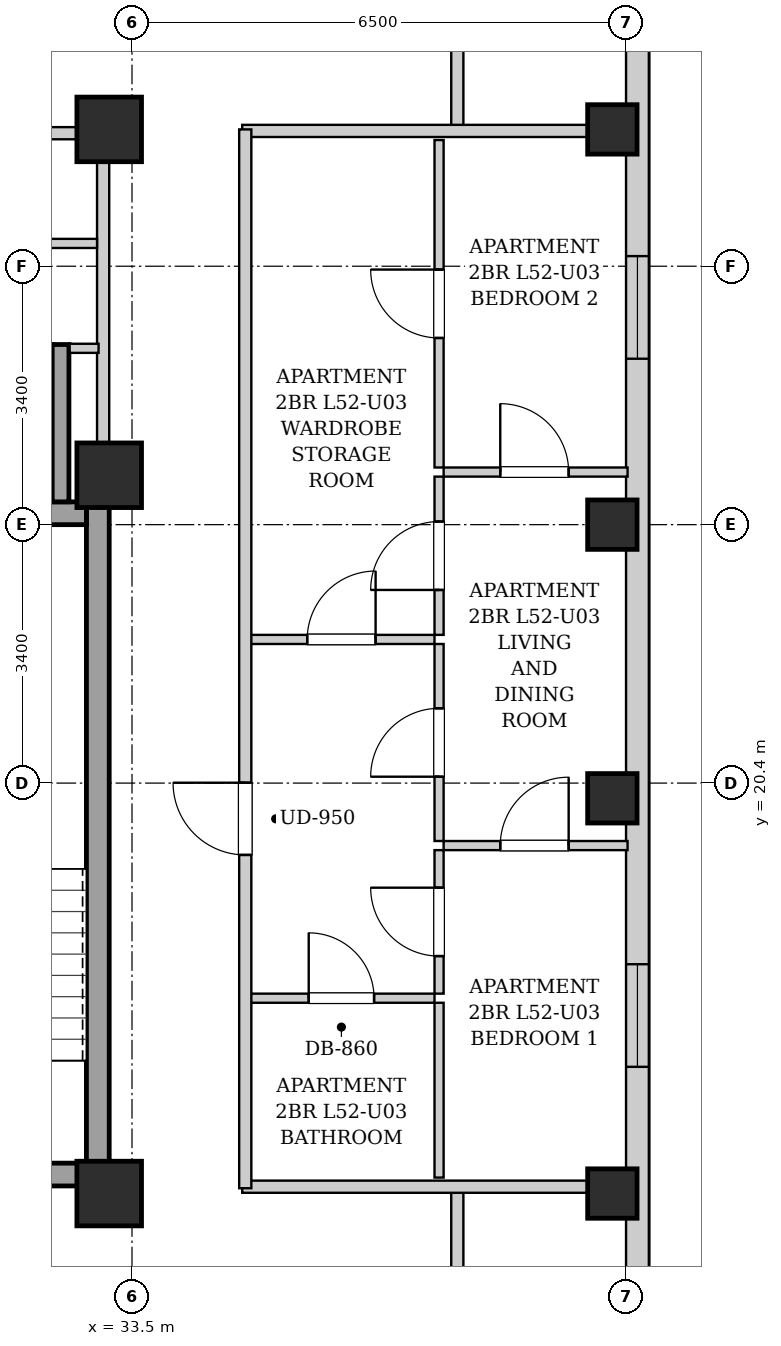
"""IFC4 building model, lengths in metres.
Left out: names, types, materials, properties, quantities, classifications, styles, units other than length and angle.
Written with IfcOpenShell. Run it as: python <this file> out.ifc"""

import sys

from ifc_helpers import new_model, si_unit, direction, frame, frame_2d, origin, origin_2d, place, context, subcontext, project, spatial, rectangle, extrude, element, fill, save


model = new_model("IFC4")
c1 = context("Model", 3, precision=1e-05, world=origin(), true_north=direction((0.0, 1.0)))
c2 = subcontext(c1, "Body", "Model", "MODEL_VIEW")
j1 = project(units=[si_unit("LENGTHUNIT", "METRE"), si_unit("PLANEANGLEUNIT", "RADIAN")], contexts=[c1])
p1 = place(None, origin())
s1 = spatial("IfcSite", under=j1, at=p1, CompositionType="ELEMENT")
p2 = place(p1, origin())
s2 = spatial("IfcBuilding", under=s1, at=p2, CompositionType="ELEMENT")
p3 = place(p2, frame((0.0, 0.0, 181.0)))
s3 = spatial("IfcBuildingStorey", under=s2, at=p3, CompositionType="ELEMENT", Elevation=181.0)
for number, where, z_axis, x_axis in (
    (1, (39.82, 15.0, 0.0), (0.0, 0.0, 1.0), (1.0, 0.0, 0.0)),
    (2, (39.82, 20.2, 0.0), (0.0, 0.0, 1.0), (1.0, 0.0, 0.0)),
    (3, (39.82, 23.8, 0.0), (0.0, 0.0, 1.0), (1.0, 0.0, 0.0)),
    (4, (39.82, 29.0, 0.0), (0.0, 0.0, 1.0), (1.0, 0.0, 0.0)),
):
    element("IfcColumn", number, at=place(p3, frame(where, z_axis=z_axis, x_axis=x_axis)), inside=s3, PredefinedType="COLUMN", context=c2, shape_type="SweptSolid", body=[
        extrude(rectangle(XDim=0.65, YDim=0.65, at=origin_2d()), origin(), (0.0, 0.0, 1.0), 3.3),
    ])
for number, where, z_axis, x_axis in (
    (5, (33.2, 15.0, 0.0), (0.0, 0.0, 1.0), (1.0, 0.0, 0.0)),
    (6, (33.2, 29.0, 0.0), (0.0, 0.0, 1.0), (1.0, 0.0, 0.0)),
    (7, (33.2, 24.45, 0.0), (0.0, 0.0, 1.0), (1.0, 0.0, 0.0)),
):
    element("IfcColumn", number, at=place(p3, frame(where, z_axis=z_axis, x_axis=x_axis)), inside=s3, PredefinedType="COLUMN", context=c2, shape_type="SweptSolid", body=[
        extrude(rectangle(XDim=0.85, YDim=0.85, at=origin_2d()), origin(), (0.0, 0.0, 1.0), 3.3),
    ])
p4 = place(p3, frame((40.15, 37.7, 0.0), z_axis=(0.0, 0.0, 1.0), x_axis=(0.0, -1.0, 0.0)))
e8 = element("IfcWall", 8, at=p4, inside=s3, PredefinedType="SOLIDWALL", context=c2, shape_type="SweptSolid", body=[
    extrude(rectangle(XDim=31.4, YDim=0.3, at=frame_2d((15.7, 0.0))), origin(), (0.0, 0.0, 1.0), 3.04),
])
p5 = place(p4, frame((28.396, 0.0, 0.55)))
e9 = element("IfcOpeningElement", 9, at=p5, cuts=e8, PredefinedType="OPENING", context=c2, shape_type="SweptSolid", body=[
    extrude(rectangle(XDim=1.35, YDim=1.2, at=frame_2d((0.675, 0.6))), frame((0.0, 0.16, 0.0), z_axis=(0.0, -1.0, 0.0), x_axis=(1.0, 0.0, 0.0)), (0.0, 0.0, 1.0), 0.32),
])
p6 = place(p4, frame((1.653, 0.0, 0.55)))
e10 = element("IfcOpeningElement", 10, at=p6, cuts=e8, PredefinedType="OPENING", context=c2, shape_type="SweptSolid", body=[
    extrude(rectangle(XDim=1.35, YDim=1.2, at=frame_2d((0.675, 0.6))), frame((0.0, 0.16, 0.0), z_axis=(0.0, -1.0, 0.0), x_axis=(1.0, 0.0, 0.0)), (0.0, 0.0, 1.0), 0.32),
])
p7 = place(p4, frame((19.683, 0.0, 0.55)))
e11 = element("IfcOpeningElement", 11, at=p7, cuts=e8, PredefinedType="OPENING", context=c2, shape_type="SweptSolid", body=[
    extrude(rectangle(XDim=1.35, YDim=1.2, at=frame_2d((0.675, 0.6))), frame((0.0, 0.16, 0.0), z_axis=(0.0, -1.0, 0.0), x_axis=(1.0, 0.0, 0.0)), (0.0, 0.0, 1.0), 0.32),
])
p8 = place(p4, frame((10.367, 0.0, 0.55)))
e12 = element("IfcOpeningElement", 12, at=p8, cuts=e8, PredefinedType="OPENING", context=c2, shape_type="SweptSolid", body=[
    extrude(rectangle(XDim=1.35, YDim=1.2, at=frame_2d((0.675, 0.6))), frame((0.0, 0.16, 0.0), z_axis=(0.0, -1.0, 0.0), x_axis=(1.0, 0.0, 0.0)), (0.0, 0.0, 1.0), 0.32),
])
p9 = place(p3, frame((33.05, 15.1, 0.0), z_axis=(0.0, 0.0, 1.0), x_axis=(0.0, 1.0, 0.0)))
e13 = element("IfcWall", 13, at=p9, inside=s3, PredefinedType="SHEAR", context=c2, shape_type="SweptSolid", body=[
    extrude(rectangle(XDim=9.0, YDim=0.3, at=frame_2d((4.5, 0.0))), origin(), (0.0, 0.0, 1.0), 3.04),
])
p10 = place(p3, frame((30.05, 23.95, 0.0), z_axis=(0.0, 0.0, 1.0), x_axis=(1.0, 0.0, 0.0)))
e14 = element("IfcWall", 14, at=p10, inside=s3, PredefinedType="SHEAR", context=c2, shape_type="SweptSolid", body=[
    extrude(rectangle(XDim=2.85, YDim=0.3, at=frame_2d((1.425, 0.0))), origin(), (0.0, 0.0, 1.0), 3.04),
])
p11 = place(p3, frame((30.05, 15.25, 0.0), z_axis=(0.0, 0.0, 1.0), x_axis=(1.0, 0.0, 0.0)))
e15 = element("IfcWall", 15, at=p11, inside=s3, PredefinedType="SHEAR", context=c2, shape_type="SweptSolid", body=[
    extrude(rectangle(XDim=2.85, YDim=0.3, at=frame_2d((1.425, 0.0))), origin(), (0.0, 0.0, 1.0), 3.04),
])
p12 = place(p11, frame((0.86, 0.0, 0.0)))
e16 = element("IfcOpeningElement", 16, at=p12, cuts=e15, PredefinedType="OPENING", context=c2, shape_type="SweptSolid", body=[
    extrude(rectangle(XDim=1.1, YDim=2.05, at=frame_2d((0.55, 1.025))), frame((0.0, 0.16, 0.0), z_axis=(0.0, -1.0, 0.0), x_axis=(1.0, 0.0, 0.0)), (0.0, 0.0, 1.0), 0.32),
])
p13 = place(p3, frame((32.56, 24.1, 0.0), z_axis=(0.0, 0.0, 1.0), x_axis=(0.0, 1.0, 0.0)))
e17 = element("IfcWall", 17, at=p13, inside=s3, PredefinedType="SHEAR", context=c2, shape_type="SweptSolid", body=[
    extrude(rectangle(XDim=2.07, YDim=0.22, at=frame_2d((1.035, 0.0))), origin(), (0.0, 0.0, 1.0), 3.04),
])
p14 = place(p3, frame((33.12, 24.12, 0.0), z_axis=(0.0, 0.0, 1.0), x_axis=(0.0, 1.0, 0.0)))
e18 = element("IfcWall", 18, at=p14, inside=s3, PredefinedType="PARTITIONING", context=c2, shape_type="SweptSolid", body=[
    extrude(rectangle(XDim=4.76, YDim=0.16, at=frame_2d((2.38, 0.0))), origin(), (0.0, 0.0, 1.0), 3.04),
])
p15 = place(p3, frame((32.68, 26.12, 0.0), z_axis=(0.0, 0.0, 1.0), x_axis=(1.0, 0.0, 0.0)))
e19 = element("IfcWall", 19, at=p15, inside=s3, PredefinedType="PARTITIONING", context=c2, shape_type="SweptSolid", body=[
    extrude(rectangle(XDim=0.38, YDim=0.12, at=frame_2d((0.19, 0.0))), origin(), (0.0, 0.0, 1.0), 3.04),
])
p16 = place(p3, frame((30.12, 27.5, 0.0), z_axis=(0.0, 0.0, 1.0), x_axis=(1.0, 0.0, 0.0)))
e20 = element("IfcWall", 20, at=p16, inside=s3, PredefinedType="PARTITIONING", context=c2, shape_type="SweptSolid", body=[
    extrude(rectangle(XDim=2.92, YDim=0.12, at=frame_2d((1.46, 0.0))), origin(), (0.0, 0.0, 1.0), 3.04),
])
p17 = place(p16, frame((0.97, 0.0, 0.0)))
e21 = element("IfcOpeningElement", 21, at=p17, cuts=e20, PredefinedType="OPENING", context=c2, shape_type="SweptSolid", body=[
    extrude(rectangle(XDim=0.86, YDim=2.05, at=frame_2d((0.43, 1.025))), frame((0.0, 0.07, 0.0), z_axis=(0.0, -1.0, 0.0), x_axis=(1.0, 0.0, 0.0)), (0.0, 0.0, 1.0), 0.14),
])
p18 = place(p3, frame((25.72, 28.95, 0.0), z_axis=(0.0, 0.0, 1.0), x_axis=(1.0, 0.0, 0.0)))
e22 = element("IfcWall", 22, at=p18, inside=s3, PredefinedType="PARTITIONING", context=c2, shape_type="SweptSolid", body=[
    extrude(rectangle(XDim=7.32, YDim=0.16, at=frame_2d((3.66, 0.0))), origin(), (0.0, 0.0, 1.0), 2.556),
])
p19 = place(p18, frame((1.27, 0.0, 0.0)))
e23 = element("IfcOpeningElement", 23, at=p19, cuts=e22, PredefinedType="OPENING", context=c2, shape_type="SweptSolid", body=[
    extrude(rectangle(XDim=0.86, YDim=2.05, at=frame_2d((0.43, 1.025))), frame((0.0, 0.09, 0.0), z_axis=(0.0, -1.0, 0.0), x_axis=(1.0, 0.0, 0.0)), (0.0, 0.0, 1.0), 0.18),
])
for number, where, z_axis, x_axis in (
    (24, (37.78, 13.51, 0.0), (0.0, 0.0, 1.0), (0.0, 1.0, 0.0)),
    (25, (37.78, 28.98, 0.0), (0.0, 0.0, 1.0), (0.0, 1.0, 0.0)),
):
    element("IfcWall", number, at=place(p3, frame(where, z_axis=z_axis, x_axis=x_axis)), inside=s3, PredefinedType="PARTITIONING", context=c2, shape_type="SweptSolid", body=[
        extrude(rectangle(XDim=1.58, YDim=0.16, at=frame_2d((0.79, 0.0))), origin(), (0.0, 0.0, 1.0), 3.04),
    ])
for number, where, z_axis, x_axis in (
    (26, (34.95, 15.09, 0.0), (0.0, 0.0, 1.0), (1.0, 0.0, 0.0)),
    (27, (34.95, 28.98, 0.0), (0.0, 0.0, 1.0), (1.0, 0.0, 0.0)),
):
    element("IfcWall", number, at=place(p3, frame(where, z_axis=z_axis, x_axis=x_axis)), inside=s3, PredefinedType="PARTITIONING", context=c2, shape_type="SweptSolid", body=[
        extrude(rectangle(XDim=5.07, YDim=0.16, at=frame_2d((2.535, 0.0))), origin(), (0.0, 0.0, 1.0), 2.556),
    ])
p20 = place(p3, frame((35.03, 22.29, 0.0), z_axis=(0.0, 0.0, 1.0), x_axis=(1.0, 0.0, 0.0)))
e28 = element("IfcWall", 28, at=p20, inside=s3, PredefinedType="PARTITIONING", context=c2, shape_type="SweptSolid", body=[
    extrude(rectangle(XDim=2.45, YDim=0.12, at=frame_2d((1.225, 0.0))), origin(), (0.0, 0.0, 1.0), 3.04),
])
p21 = place(p20, frame((0.775, 0.0, 0.0)))
e29 = element("IfcOpeningElement", 29, at=p21, cuts=e28, PredefinedType="OPENING", context=c2, shape_type="SweptSolid", body=[
    extrude(rectangle(XDim=0.9, YDim=2.05, at=frame_2d((0.45, 1.025))), frame((0.0, 0.07, 0.0), z_axis=(0.0, -1.0, 0.0), x_axis=(1.0, 0.0, 0.0)), (0.0, 0.0, 1.0), 0.14),
])
p22 = place(p3, frame((37.54, 22.35, 0.0), z_axis=(0.0, 0.0, 1.0), x_axis=(0.0, 1.0, 0.0)))
e30 = element("IfcWall", 30, at=p22, inside=s3, PredefinedType="PARTITIONING", context=c2, shape_type="SweptSolid", body=[
    extrude(rectangle(XDim=2.082, YDim=0.12, at=frame_2d((1.041, 0.0))), origin(), (0.0, 0.0, 1.0), 3.04),
])
p23 = place(p22, frame((0.591, 0.0, 0.0)))
e31 = element("IfcOpeningElement", 31, at=p23, cuts=e30, PredefinedType="OPENING", context=c2, shape_type="SweptSolid", body=[
    extrude(rectangle(XDim=0.9, YDim=2.05, at=frame_2d((0.45, 1.025))), frame((0.0, 0.07, 0.0), z_axis=(0.0, -1.0, 0.0), x_axis=(1.0, 0.0, 0.0)), (0.0, 0.0, 1.0), 0.14),
])
p24 = place(p3, frame((37.54, 24.552, 0.0), z_axis=(0.0, 0.0, 1.0), x_axis=(0.0, 1.0, 0.0)))
e32 = element("IfcWall", 32, at=p24, inside=s3, PredefinedType="PARTITIONING", context=c2, shape_type="SweptSolid", body=[
    extrude(rectangle(XDim=4.308, YDim=0.12, at=frame_2d((2.154, 0.0))), origin(), (0.0, 0.0, 1.0), 3.04),
])
p25 = place(p24, frame((1.704, 0.0, 0.0)))
e33 = element("IfcOpeningElement", 33, at=p25, cuts=e32, PredefinedType="OPENING", context=c2, shape_type="SweptSolid", body=[
    extrude(rectangle(XDim=0.9, YDim=2.05, at=frame_2d((0.45, 1.025))), frame((0.0, 0.07, 0.0), z_axis=(0.0, -1.0, 0.0), x_axis=(1.0, 0.0, 0.0)), (0.0, 0.0, 1.0), 0.14),
])
p26 = place(p3, frame((35.03, 17.57, 0.0), z_axis=(0.0, 0.0, 1.0), x_axis=(1.0, 0.0, 0.0)))
e34 = element("IfcWall", 34, at=p26, inside=s3, PredefinedType="PARTITIONING", context=c2, shape_type="SweptSolid", body=[
    extrude(rectangle(XDim=2.45, YDim=0.12, at=frame_2d((1.225, 0.0))), origin(), (0.0, 0.0, 1.0), 3.04),
])
p27 = place(p26, frame((0.795, 0.0, 0.0)))
e35 = element("IfcOpeningElement", 35, at=p27, cuts=e34, PredefinedType="OPENING", context=c2, shape_type="SweptSolid", body=[
    extrude(rectangle(XDim=0.86, YDim=2.05, at=frame_2d((0.43, 1.025))), frame((0.0, 0.07, 0.0), z_axis=(0.0, -1.0, 0.0), x_axis=(1.0, 0.0, 0.0)), (0.0, 0.0, 1.0), 0.14),
])
p28 = place(p3, frame((37.54, 15.21, 0.0), z_axis=(0.0, 0.0, 1.0), x_axis=(0.0, 1.0, 0.0)))
e36 = element("IfcWall", 36, at=p28, inside=s3, PredefinedType="PARTITIONING", context=c2, shape_type="SweptSolid", body=[
    extrude(rectangle(XDim=2.3, YDim=0.12, at=frame_2d((1.15, 0.0))), origin(), (0.0, 0.0, 1.0), 3.04),
])
p29 = place(p3, frame((37.54, 17.63, 0.0), z_axis=(0.0, 0.0, 1.0), x_axis=(0.0, 1.0, 0.0)))
e37 = element("IfcWall", 37, at=p29, inside=s3, PredefinedType="PARTITIONING", context=c2, shape_type="SweptSolid", body=[
    extrude(rectangle(XDim=1.888, YDim=0.12, at=frame_2d((0.944, 0.0))), origin(), (0.0, 0.0, 1.0), 3.04),
])
p30 = place(p29, frame((0.494, 0.0, 0.0)))
e38 = element("IfcOpeningElement", 38, at=p30, cuts=e37, PredefinedType="OPENING", context=c2, shape_type="SweptSolid", body=[
    extrude(rectangle(XDim=0.9, YDim=2.05, at=frame_2d((0.45, 1.025))), frame((0.0, 0.07, 0.0), z_axis=(0.0, -1.0, 0.0), x_axis=(1.0, 0.0, 0.0)), (0.0, 0.0, 1.0), 0.14),
])
p31 = place(p3, frame((37.54, 19.638, 0.0), z_axis=(0.0, 0.0, 1.0), x_axis=(0.0, 1.0, 0.0)))
e39 = element("IfcWall", 39, at=p31, inside=s3, PredefinedType="PARTITIONING", context=c2, shape_type="SweptSolid", body=[
    extrude(rectangle(XDim=2.592, YDim=0.12, at=frame_2d((1.296, 0.0))), origin(), (0.0, 0.0, 1.0), 3.04),
])
p32 = place(p31, frame((0.846, 0.0, 0.0)))
e40 = element("IfcOpeningElement", 40, at=p32, cuts=e39, PredefinedType="OPENING", context=c2, shape_type="SweptSolid", body=[
    extrude(rectangle(XDim=0.9, YDim=2.05, at=frame_2d((0.45, 1.025))), frame((0.0, 0.07, 0.0), z_axis=(0.0, -1.0, 0.0), x_axis=(1.0, 0.0, 0.0)), (0.0, 0.0, 1.0), 0.14),
])
p33 = place(p3, frame((37.6, 19.578, 0.0), z_axis=(0.0, 0.0, 1.0), x_axis=(1.0, 0.0, 0.0)))
e41 = element("IfcWall", 41, at=p33, inside=s3, PredefinedType="PARTITIONING", context=c2, shape_type="SweptSolid", body=[
    extrude(rectangle(XDim=2.42, YDim=0.12, at=frame_2d((1.21, 0.0))), origin(), (0.0, 0.0, 1.0), 3.04),
])
p34 = place(p33, frame((0.745, 0.0, 0.0)))
e42 = element("IfcOpeningElement", 42, at=p34, cuts=e41, PredefinedType="OPENING", context=c2, shape_type="SweptSolid", body=[
    extrude(rectangle(XDim=0.9, YDim=2.05, at=frame_2d((0.45, 1.025))), frame((0.0, 0.07, 0.0), z_axis=(0.0, -1.0, 0.0), x_axis=(1.0, 0.0, 0.0)), (0.0, 0.0, 1.0), 0.14),
])
p35 = place(p3, frame((37.6, 24.492, 0.0), z_axis=(0.0, 0.0, 1.0), x_axis=(1.0, 0.0, 0.0)))
e43 = element("IfcWall", 43, at=p35, inside=s3, PredefinedType="PARTITIONING", context=c2, shape_type="SweptSolid", body=[
    extrude(rectangle(XDim=2.42, YDim=0.12, at=frame_2d((1.21, 0.0))), origin(), (0.0, 0.0, 1.0), 2.722),
])
p36 = place(p35, frame((0.745, 0.0, 0.0)))
e44 = element("IfcOpeningElement", 44, at=p36, cuts=e43, PredefinedType="OPENING", context=c2, shape_type="SweptSolid", body=[
    extrude(rectangle(XDim=0.9, YDim=2.05, at=frame_2d((0.45, 1.025))), frame((0.0, 0.07, 0.0), z_axis=(0.0, -1.0, 0.0), x_axis=(1.0, 0.0, 0.0)), (0.0, 0.0, 1.0), 0.14),
])
p37 = place(p3, frame((34.99, 15.07, 0.0), z_axis=(0.0, 0.0, 1.0), x_axis=(0.0, 1.0, 0.0)))
e45 = element("IfcWall", 45, at=p37, inside=s3, PredefinedType="PARTITIONING", context=c2, shape_type="SweptSolid", body=[
    extrude(rectangle(XDim=13.93, YDim=0.16, at=frame_2d((6.965, 0.0))), origin(), (0.0, 0.0, 1.0), 3.04),
])
p38 = place(p37, frame((4.385, 0.0, 0.0)))
e46 = element("IfcOpeningElement", 46, at=p38, cuts=e45, PredefinedType="OPENING", context=c2, shape_type="SweptSolid", body=[
    extrude(rectangle(XDim=0.95, YDim=2.1, at=frame_2d((0.475, 1.05))), frame((0.0, 0.09, 0.0), z_axis=(0.0, -1.0, 0.0), x_axis=(1.0, 0.0, 0.0)), (0.0, 0.0, 1.0), 0.18),
])
p39 = place(p21, origin())
e47 = element("IfcDoor", 47, at=p39, inside=s3, OperationType="SINGLE_SWING_RIGHT", PredefinedType="DOOR", context=c2, shape_type="SweptSolid", body=[
    extrude(rectangle(XDim=0.9, YDim=2.05, at=frame_2d((0.45, 1.025))), frame((0.0, 0.025, 0.0), z_axis=(0.0, -1.0, 0.0), x_axis=(1.0, 0.0, 0.0)), (0.0, 0.0, 1.0), 0.05),
])
fill(e29, e47)
p40 = place(p23, origin())
e48 = element("IfcDoor", 48, at=p40, inside=s3, OperationType="SINGLE_SWING_LEFT", PredefinedType="DOOR", context=c2, shape_type="SweptSolid", body=[
    extrude(rectangle(XDim=0.9, YDim=2.05, at=frame_2d((0.45, 1.025))), frame((0.0, 0.025, 0.0), z_axis=(0.0, -1.0, 0.0), x_axis=(1.0, 0.0, 0.0)), (0.0, 0.0, 1.0), 0.05),
])
fill(e31, e48)
p41 = place(p25, origin())
e49 = element("IfcDoor", 49, at=p41, inside=s3, OperationType="SINGLE_SWING_RIGHT", PredefinedType="DOOR", context=c2, shape_type="SweptSolid", body=[
    extrude(rectangle(XDim=0.9, YDim=2.05, at=frame_2d((0.45, 1.025))), frame((0.0, 0.025, 0.0), z_axis=(0.0, -1.0, 0.0), x_axis=(1.0, 0.0, 0.0)), (0.0, 0.0, 1.0), 0.05),
])
fill(e33, e49)
p42 = place(p27, origin())
e50 = element("IfcDoor", 50, at=p42, inside=s3, OperationType="SINGLE_SWING_LEFT", PredefinedType="DOOR", context=c2, shape_type="SweptSolid", body=[
    extrude(rectangle(XDim=0.86, YDim=2.05, at=frame_2d((0.43, 1.025))), frame((0.0, 0.025, 0.0), z_axis=(0.0, -1.0, 0.0), x_axis=(1.0, 0.0, 0.0)), (0.0, 0.0, 1.0), 0.05),
])
fill(e35, e50)
p43 = place(p30, origin())
e51 = element("IfcDoor", 51, at=p43, inside=s3, OperationType="SINGLE_SWING_RIGHT", PredefinedType="DOOR", context=c2, shape_type="SweptSolid", body=[
    extrude(rectangle(XDim=0.9, YDim=2.05, at=frame_2d((0.45, 1.025))), frame((0.0, 0.025, 0.0), z_axis=(0.0, -1.0, 0.0), x_axis=(1.0, 0.0, 0.0)), (0.0, 0.0, 1.0), 0.05),
])
fill(e38, e51)
p44 = place(p32, origin())
e52 = element("IfcDoor", 52, at=p44, inside=s3, OperationType="SINGLE_SWING_LEFT", PredefinedType="DOOR", context=c2, shape_type="SweptSolid", body=[
    extrude(rectangle(XDim=0.9, YDim=2.05, at=frame_2d((0.45, 1.025))), frame((0.0, 0.025, 0.0), z_axis=(0.0, -1.0, 0.0), x_axis=(1.0, 0.0, 0.0)), (0.0, 0.0, 1.0), 0.05),
])
fill(e40, e52)
p45 = place(p34, origin())
e53 = element("IfcDoor", 53, at=p45, inside=s3, OperationType="SINGLE_SWING_RIGHT", PredefinedType="DOOR", context=c2, shape_type="SweptSolid", body=[
    extrude(rectangle(XDim=0.9, YDim=2.05, at=frame_2d((0.45, 1.025))), frame((0.0, 0.025, 0.0), z_axis=(0.0, -1.0, 0.0), x_axis=(1.0, 0.0, 0.0)), (0.0, 0.0, 1.0), 0.05),
])
fill(e42, e53)
p46 = place(p36, origin())
e54 = element("IfcDoor", 54, at=p46, inside=s3, OperationType="SINGLE_SWING_LEFT", PredefinedType="DOOR", context=c2, shape_type="SweptSolid", body=[
    extrude(rectangle(XDim=0.9, YDim=2.05, at=frame_2d((0.45, 1.025))), frame((0.0, 0.025, 0.0), z_axis=(0.0, -1.0, 0.0), x_axis=(1.0, 0.0, 0.0)), (0.0, 0.0, 1.0), 0.05),
])
fill(e44, e54)
p47 = place(p38, origin())
e55 = element("IfcDoor", 55, at=p47, inside=s3, OperationType="SINGLE_SWING_RIGHT", PredefinedType="DOOR", context=c2, shape_type="SweptSolid", body=[
    extrude(rectangle(XDim=0.95, YDim=2.1, at=frame_2d((0.475, 1.05))), frame((0.0, 0.025, 0.0), z_axis=(0.0, -1.0, 0.0), x_axis=(1.0, 0.0, 0.0)), (0.0, 0.0, 1.0), 0.05),
])
fill(e46, e55)
p48 = place(p7, origin())
e56 = element("IfcWindow", 56, at=p48, inside=s3, PartitioningType="SINGLE_PANEL", PredefinedType="WINDOW", context=c2, shape_type="SweptSolid", body=[
    extrude(rectangle(XDim=1.35, YDim=1.2, at=frame_2d((0.675, 0.6))), frame((0.0, 0.03, 0.0), z_axis=(0.0, -1.0, 0.0), x_axis=(1.0, 0.0, 0.0)), (0.0, 0.0, 1.0), 0.06),
])
fill(e11, e56)
p49 = place(p8, origin())
e57 = element("IfcWindow", 57, at=p49, inside=s3, PartitioningType="SINGLE_PANEL", PredefinedType="WINDOW", context=c2, shape_type="SweptSolid", body=[
    extrude(rectangle(XDim=1.35, YDim=1.2, at=frame_2d((0.675, 0.6))), frame((0.0, 0.03, 0.0), z_axis=(0.0, -1.0, 0.0), x_axis=(1.0, 0.0, 0.0)), (0.0, 0.0, 1.0), 0.06),
])
fill(e12, e57)
save(model, sys.argv[1])
